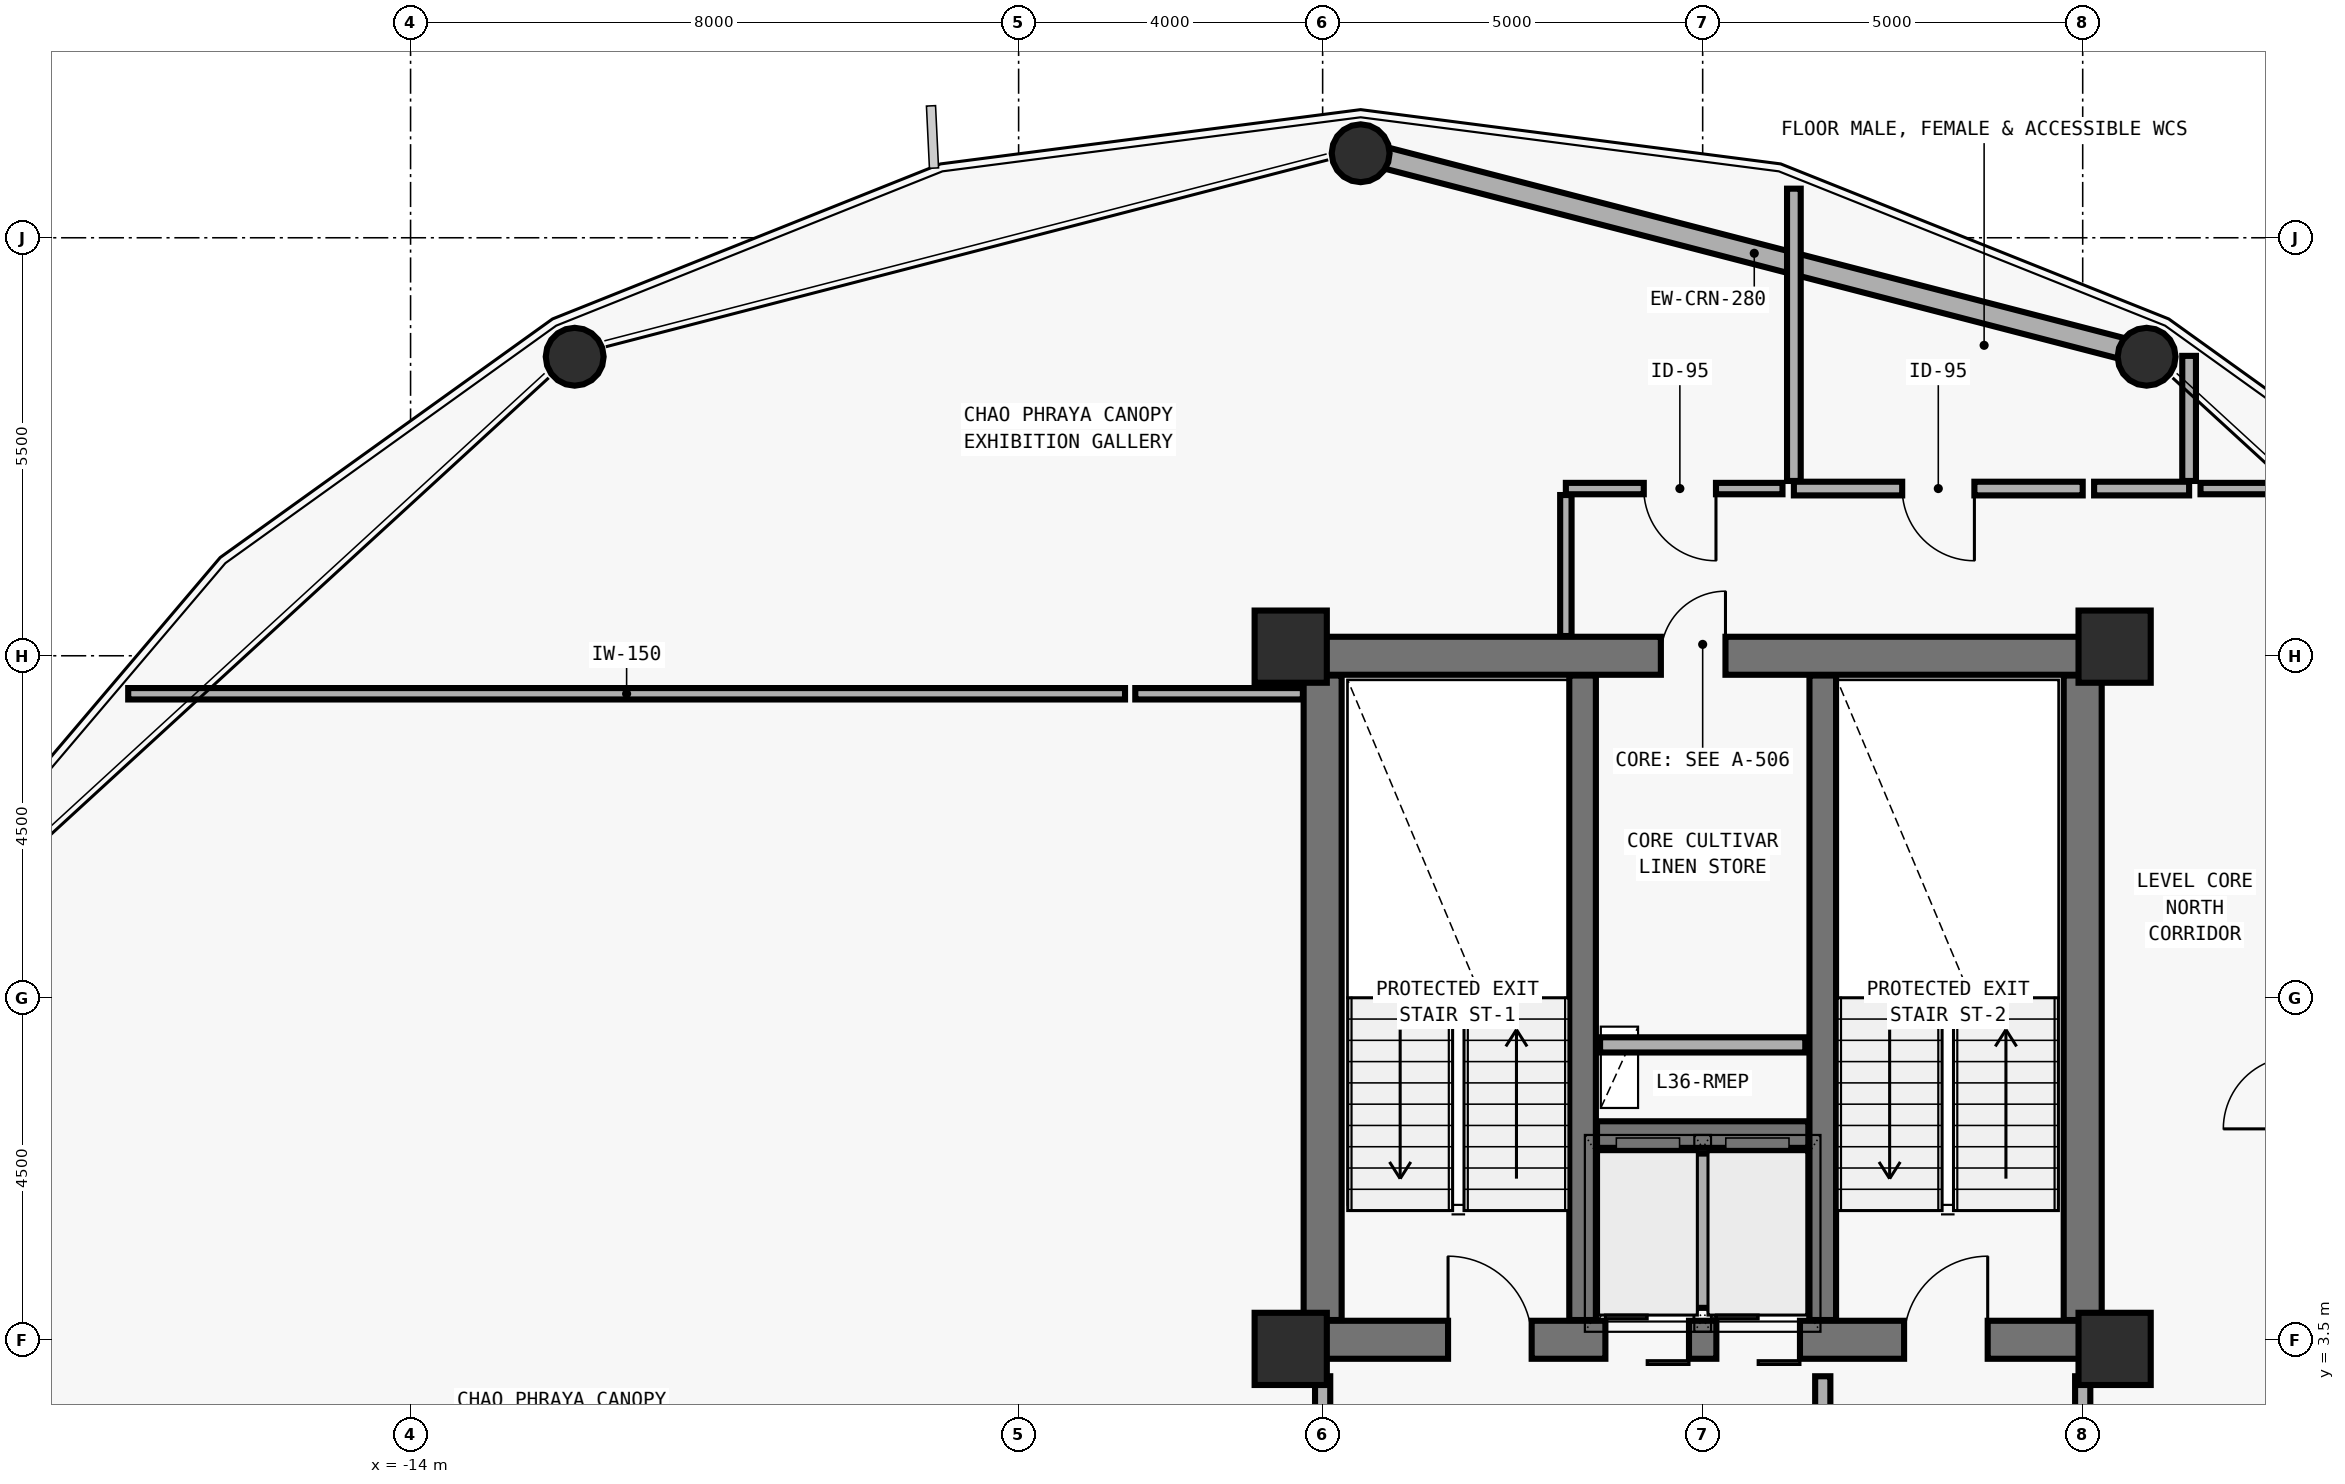
"""IFC4 building model, lengths in metres.
Left out: names, types, materials, properties, quantities, classifications, styles, units other than length and angle.
Written with IfcOpenShell. Run it as: python <this file> out.ifc"""

import sys

from ifc_helpers import new_model, si_unit, direction, frame, frame_2d, origin, origin_2d, place, context, subcontext, project, spatial, rectangle, hollow_circle, extrude, element, fill, save


model = new_model("IFC4")
c1 = context("Model", 3, precision=1e-05, world=origin(), true_north=direction((0.0, 1.0)))
c2 = subcontext(c1, "Body", "Model", "MODEL_VIEW")
j1 = project(units=[si_unit("LENGTHUNIT", "METRE"), si_unit("PLANEANGLEUNIT", "RADIAN")], contexts=[c1])
p1 = place(None, origin())
s1 = spatial("IfcSite", under=j1, at=p1, CompositionType="ELEMENT")
p2 = place(p1, origin())
s2 = spatial("IfcBuilding", under=s1, at=p2, CompositionType="ELEMENT")
p3 = place(p2, frame((0.0, 0.0, 146.1)))
s3 = spatial("IfcBuildingStorey", under=s2, at=p3, CompositionType="ELEMENT", Elevation=146.1)
p4 = place(p3, frame((-2.0, 3.5, 0.0), z_axis=(0.0, 0.0, 1.0), x_axis=(1.0, 0.0, 0.0)))
e1 = element("IfcWall", 1, at=p4, inside=s3, PredefinedType="SHEAR", context=c2, shape_type="SweptSolid", body=[
    extrude(rectangle(XDim=10.0, YDim=0.5, at=frame_2d((5.0, 0.0))), origin(), (0.0, 0.0, 1.0), 3.892),
])
p5 = place(p4, frame((1.65, 0.0, 0.0)))
e2 = element("IfcOpeningElement", 2, at=p5, cuts=e1, PredefinedType="OPENING", context=c2, shape_type="SweptSolid", body=[
    extrude(rectangle(XDim=1.1, YDim=2.15, at=frame_2d((0.55, 1.075))), frame((0.0, 0.26, 0.0), z_axis=(0.0, -1.0, 0.0), x_axis=(1.0, 0.0, 0.0)), (0.0, 0.0, 1.0), 0.52),
])
p6 = place(p4, frame((7.65, 0.0, 0.0)))
e3 = element("IfcOpeningElement", 3, at=p6, cuts=e1, PredefinedType="OPENING", context=c2, shape_type="SweptSolid", body=[
    extrude(rectangle(XDim=1.1, YDim=2.15, at=frame_2d((0.55, 1.075))), frame((0.0, 0.26, 0.0), z_axis=(0.0, -1.0, 0.0), x_axis=(1.0, 0.0, 0.0)), (0.0, 0.0, 1.0), 0.52),
])
p7 = place(p4, frame((3.72, 0.0, 0.0)))
e4 = element("IfcOpeningElement", 4, at=p7, cuts=e1, PredefinedType="OPENING", context=c2, shape_type="SweptSolid", body=[
    extrude(rectangle(XDim=1.1, YDim=2.2, at=frame_2d((0.55, 1.1))), frame((0.0, 0.26, 0.0), z_axis=(0.0, -1.0, 0.0), x_axis=(1.0, 0.0, 0.0)), (0.0, 0.0, 1.0), 0.52),
])
p8 = place(p4, frame((5.18, 0.0, 0.0)))
e5 = element("IfcOpeningElement", 5, at=p8, cuts=e1, PredefinedType="OPENING", context=c2, shape_type="SweptSolid", body=[
    extrude(rectangle(XDim=1.1, YDim=2.2, at=frame_2d((0.55, 1.1))), frame((0.0, 0.26, 0.0), z_axis=(0.0, -1.0, 0.0), x_axis=(1.0, 0.0, 0.0)), (0.0, 0.0, 1.0), 0.52),
])
p9 = place(p3, frame((-2.0, 12.5, 0.0), z_axis=(0.0, 0.0, 1.0), x_axis=(1.0, 0.0, 0.0)))
e6 = element("IfcWall", 6, at=p9, inside=s3, PredefinedType="SHEAR", context=c2, shape_type="SweptSolid", body=[
    extrude(rectangle(XDim=10.0, YDim=0.5, at=frame_2d((5.0, 0.0))), origin(), (0.0, 0.0, 1.0), 3.892),
])
p10 = place(p9, frame((4.45, 0.0, 0.0)))
e7 = element("IfcOpeningElement", 7, at=p10, cuts=e6, PredefinedType="OPENING", context=c2, shape_type="SweptSolid", body=[
    extrude(rectangle(XDim=0.85, YDim=2.1, at=frame_2d((0.425, 1.05))), frame((0.0, 0.26, 0.0), z_axis=(0.0, -1.0, 0.0), x_axis=(1.0, 0.0, 0.0)), (0.0, 0.0, 1.0), 0.52),
])
for number, where, z_axis, x_axis in (
    (8, (-2.0, 3.76, 0.0), (0.0, 0.0, 1.0), (0.0, 1.0, 0.0)),
    (9, (8.0, 3.76, 0.0), (0.0, 0.0, 1.0), (0.0, 1.0, 0.0)),
):
    element("IfcWall", number, at=place(p3, frame(where, z_axis=z_axis, x_axis=x_axis)), inside=s3, PredefinedType="SHEAR", context=c2, shape_type="SweptSolid", body=[
        extrude(rectangle(XDim=8.48, YDim=0.5, at=frame_2d((4.24, 0.0))), origin(), (0.0, 0.0, 1.0), 3.892),
    ])
for number, where, z_axis, x_axis in (
    (10, (1.42, 3.76, 0.0), (0.0, 0.0, 1.0), (0.0, 1.0, 0.0)),
    (11, (4.58, 3.76, 0.0), (0.0, 0.0, 1.0), (0.0, 1.0, 0.0)),
):
    element("IfcWall", number, at=place(p3, frame(where, z_axis=z_axis, x_axis=x_axis)), inside=s3, PredefinedType="SHEAR", context=c2, shape_type="SweptSolid", body=[
        extrude(rectangle(XDim=8.48, YDim=0.35, at=frame_2d((4.24, 0.0))), origin(), (0.0, 0.0, 1.0), 3.892),
    ])
p11 = place(p3, frame((1.61, 6.2, 0.0), z_axis=(0.0, 0.0, 1.0), x_axis=(1.0, 0.0, 0.0)))
e12 = element("IfcWall", 12, at=p11, inside=s3, PredefinedType="SHEAR", context=c2, shape_type="SweptSolid", body=[
    extrude(rectangle(XDim=2.78, YDim=0.35, at=frame_2d((1.39, 0.0))), origin(), (0.0, 0.0, 1.0), 3.892),
])
for number, where, z_axis, x_axis in (
    (13, (-2.42, 12.62, 0.0), (0.0, 0.0, 1.0), (1.0, 0.0, 0.0)),
    (14, (8.42, 12.62, 0.0), (0.0, 0.0, 1.0), (1.0, 0.0, 0.0)),
    (15, (-2.42, 3.38, 0.0), (0.0, 0.0, 1.0), (1.0, 0.0, 0.0)),
    (16, (8.42, 3.38, 0.0), (0.0, 0.0, 1.0), (1.0, 0.0, 0.0)),
):
    element("IfcColumn", number, at=place(p3, frame(where, z_axis=z_axis, x_axis=x_axis)), inside=s3, PredefinedType="COLUMN", context=c2, shape_type="SweptSolid", body=[
        extrude(rectangle(XDim=0.95, YDim=0.95, at=origin_2d()), origin(), (0.0, 0.0, 1.0), 3.875),
    ])
p12 = place(p3, frame((8.857, 16.455, 0.0), z_axis=(-0.008630735893, -0.010709672276, 0.999905402184), x_axis=(0.77862958397, -0.627483841199, 0.0)))
e17 = element("IfcColumn", 17, at=p12, inside=s3, PredefinedType="COLUMN", context=c2, shape_type="SweptSolid", body=[
    extrude(hollow_circle(Radius=0.381, WallThickness=0.028, at=origin_2d()), origin(), (0.0, 0.0, 1.0), 3.875),
])
p13 = place(p3, frame((-1.5, 19.136, 0.0), z_axis=(0.0, -0.01241083843, 0.999922982579), x_axis=(1.0, 0.0, 0.0)))
e18 = element("IfcColumn", 18, at=p13, inside=s3, PredefinedType="COLUMN", context=c2, shape_type="SweptSolid", body=[
    extrude(hollow_circle(Radius=0.381, WallThickness=0.028, at=origin_2d()), origin(), (0.0, 0.0, 1.0), 3.875),
])
p14 = place(p3, frame((-11.857, 16.455, 0.0), z_axis=(0.008630735893, -0.010709672276, 0.999905402184), x_axis=(0.77862958397, 0.627483841199, 0.0)))
e19 = element("IfcColumn", 19, at=p14, inside=s3, PredefinedType="COLUMN", context=c2, shape_type="SweptSolid", body=[
    extrude(hollow_circle(Radius=0.381, WallThickness=0.028, at=origin_2d()), origin(), (0.0, 0.0, 1.0), 3.875),
])
p15 = place(p3, frame((-1.175, 19.052, 0.0), z_axis=(0.0, 0.0, 1.0), x_axis=(0.968104156691, -0.250548082806, 0.0)))
e20 = element("IfcWall", 20, at=p15, inside=s3, PredefinedType="SOLIDWALL", context=c2, shape_type="SweptSolid", body=[
    extrude(rectangle(XDim=10.027, YDim=0.28, at=frame_2d((5.013, 0.0))), origin(), (0.0, 0.0, 1.0), 3.16),
])
p16 = place(p3, frame((3.0, 3.92, 0.0), z_axis=(0.0, 0.0, 1.0), x_axis=(0.0, 1.0, 0.0)))
e21 = element("IfcWall", 21, at=p16, inside=s3, PredefinedType="SOLIDWALL", context=c2, shape_type="SweptSolid", body=[
    extrude(rectangle(XDim=2.03, YDim=0.2, at=frame_2d((1.015, 0.0))), origin(), (0.0, 0.0, 1.0), 3.64),
])
p17 = place(p3, frame((1.65, 7.38, 0.0), z_axis=(0.0, 0.0, 1.0), x_axis=(1.0, 0.0, 0.0)))
e22 = element("IfcWall", 22, at=p17, inside=s3, PredefinedType="SOLIDWALL", context=c2, shape_type="SweptSolid", body=[
    extrude(rectangle(XDim=2.7, YDim=0.2, at=frame_2d((1.35, 0.0))), origin(), (0.0, 0.0, 1.0), 3.64),
])
p18 = place(p3, frame((4.58, 0.83, 0.0), z_axis=(0.0, 0.0, 1.0), x_axis=(0.0, 1.0, 0.0)))
e23 = element("IfcWall", 23, at=p18, inside=s3, PredefinedType="MOVABLE", context=c2, shape_type="SweptSolid", body=[
    extrude(rectangle(XDim=2.19, YDim=0.2, at=frame_2d((1.095, 0.0))), origin(), (0.0, 0.0, 1.0), 3.64),
])
p19 = place(p18, frame((0.66, 0.0, 0.0)))
e24 = element("IfcOpeningElement", 24, at=p19, cuts=e23, PredefinedType="OPENING", context=c2, shape_type="SweptSolid", body=[
    extrude(rectangle(XDim=1.0, YDim=2.1, at=frame_2d((0.5, 1.05))), frame((0.0, 0.11, 0.0), z_axis=(0.0, -1.0, 0.0), x_axis=(1.0, 0.0, 0.0)), (0.0, 0.0, 1.0), 0.22),
])
p20 = place(p3, frame((8.0, 0.72, 0.0), z_axis=(0.0, 0.0, 1.0), x_axis=(0.0, 1.0, 0.0)))
e25 = element("IfcWall", 25, at=p20, inside=s3, PredefinedType="MOVABLE", context=c2, shape_type="SweptSolid", body=[
    extrude(rectangle(XDim=2.3, YDim=0.2, at=frame_2d((1.15, 0.0))), origin(), (0.0, 0.0, 1.0), 2.872),
])
p21 = place(p20, frame((0.845, 0.0, 0.0)))
e26 = element("IfcOpeningElement", 26, at=p21, cuts=e25, PredefinedType="OPENING", context=c2, shape_type="SweptSolid", body=[
    extrude(rectangle(XDim=0.85, YDim=2.1, at=frame_2d((0.425, 1.05))), frame((0.0, 0.11, 0.0), z_axis=(0.0, -1.0, 0.0), x_axis=(1.0, 0.0, 0.0)), (0.0, 0.0, 1.0), 0.22),
])
p22 = place(p3, frame((8.0, 14.7, 0.0), z_axis=(0.0, 0.0, 1.0), x_axis=(-1.0, 0.0, 0.0)))
e27 = element("IfcWall", 27, at=p22, inside=s3, PredefinedType="PLUMBINGWALL", context=c2, shape_type="SweptSolid", body=[
    extrude(rectangle(XDim=3.8, YDim=0.18, at=frame_2d((1.9, 0.0))), origin(), (0.0, 0.0, 1.0), 3.222),
])
p23 = place(p22, frame((1.425, 0.0, 0.0)))
e28 = element("IfcOpeningElement", 28, at=p23, cuts=e27, PredefinedType="OPENING", context=c2, shape_type="SweptSolid", body=[
    extrude(rectangle(XDim=0.95, YDim=2.1, at=frame_2d((0.475, 1.05))), frame((0.0, 0.1, 0.0), z_axis=(0.0, -1.0, 0.0), x_axis=(1.0, 0.0, 0.0)), (0.0, 0.0, 1.0), 0.2),
])
p24 = place(p3, frame((4.05, 14.7, 0.0), z_axis=(0.0, 0.0, 1.0), x_axis=(-1.0, 0.0, 0.0)))
e29 = element("IfcWall", 29, at=p24, inside=s3, PredefinedType="PARTITIONING", context=c2, shape_type="SweptSolid", body=[
    extrude(rectangle(XDim=2.85, YDim=0.15, at=frame_2d((1.425, 0.0))), origin(), (0.0, 0.0, 1.0), 3.222),
])
p25 = place(p24, frame((0.875, 0.0, 0.0)))
e30 = element("IfcOpeningElement", 30, at=p25, cuts=e29, PredefinedType="OPENING", context=c2, shape_type="SweptSolid", body=[
    extrude(rectangle(XDim=0.95, YDim=2.1, at=frame_2d((0.475, 1.05))), frame((0.0, 0.085, 0.0), z_axis=(0.0, -1.0, 0.0), x_axis=(1.0, 0.0, 0.0)), (0.0, 0.0, 1.0), 0.17),
])
p26 = place(p3, frame((-2.0, 0.72, 0.0), z_axis=(0.0, 0.0, 1.0), x_axis=(0.0, 1.0, 0.0)))
e31 = element("IfcWall", 31, at=p26, inside=s3, PredefinedType="MOVABLE", context=c2, shape_type="SweptSolid", body=[
    extrude(rectangle(XDim=2.3, YDim=0.2, at=frame_2d((1.15, 0.0))), origin(), (0.0, 0.0, 1.0), 2.872),
])
p27 = place(p3, frame((9.4, 14.7, 0.0), z_axis=(0.0, 0.0, 1.0), x_axis=(-1.0, 0.0, 0.0)))
e32 = element("IfcWall", 32, at=p27, inside=s3, PredefinedType="PLUMBINGWALL", context=c2, shape_type="SweptSolid", body=[
    extrude(rectangle(XDim=1.25, YDim=0.18, at=frame_2d((0.625, 0.0))), origin(), (0.0, 0.0, 1.0), 3.222),
])
p28 = place(p3, frame((-17.715, 12.0, 0.0), z_axis=(0.0, 0.0, 1.0), x_axis=(1.0, 0.0, 0.0)))
e33 = element("IfcWall", 33, at=p28, inside=s3, PredefinedType="PARTITIONING", context=c2, shape_type="SweptSolid", body=[
    extrude(rectangle(XDim=13.115, YDim=0.15, at=frame_2d((6.558, 0.0))), origin(), (0.0, 0.0, 1.0), 3.072),
])
p29 = place(p3, frame((-4.465, 12.0, 0.0), z_axis=(0.0, 0.0, 1.0), x_axis=(1.0, 0.0, 0.0)))
e34 = element("IfcWall", 34, at=p29, inside=s3, PredefinedType="PARTITIONING", context=c2, shape_type="SweptSolid", body=[
    extrude(rectangle(XDim=2.205, YDim=0.15, at=frame_2d((1.103, 0.0))), origin(), (0.0, 0.0, 1.0), 3.072),
])
p30 = place(p3, frame((1.2, 14.615, 0.0), z_axis=(0.0, 0.0, 1.0), x_axis=(0.0, -1.0, 0.0)))
e35 = element("IfcWall", 35, at=p30, inside=s3, PredefinedType="PARTITIONING", context=c2, shape_type="SweptSolid", body=[
    extrude(rectangle(XDim=1.855, YDim=0.15, at=frame_2d((0.927, 0.0))), origin(), (0.0, 0.0, 1.0), 3.64),
])
p31 = place(p3, frame((4.2, 18.646, 0.0), z_axis=(0.0, 0.0, 1.0), x_axis=(0.0, -1.0, 0.0)))
e36 = element("IfcWall", 36, at=p31, inside=s3, PredefinedType="PLUMBINGWALL", context=c2, shape_type="SweptSolid", body=[
    extrude(rectangle(XDim=3.846, YDim=0.18, at=frame_2d((1.923, 0.0))), origin(), (0.0, 0.0, 1.0), 3.64),
])
p32 = place(p3, frame((10.715, 14.7, 0.0), z_axis=(0.0, 0.0, 1.0), x_axis=(-1.0, 0.0, 0.0)))
e37 = element("IfcWall", 37, at=p32, inside=s3, PredefinedType="PARTITIONING", context=c2, shape_type="SweptSolid", body=[
    extrude(rectangle(XDim=1.165, YDim=0.15, at=frame_2d((0.583, 0.0))), origin(), (0.0, 0.0, 1.0), 3.64),
])
p33 = place(p3, frame((9.4, 14.8, 0.0), z_axis=(0.0, 0.0, 1.0), x_axis=(0.0, 1.0, 0.0)))
e38 = element("IfcWall", 38, at=p33, inside=s3, PredefinedType="PLUMBINGWALL", context=c2, shape_type="SweptSolid", body=[
    extrude(rectangle(XDim=1.646, YDim=0.18, at=frame_2d((0.823, 0.0))), origin(), (0.0, 0.0, 1.0), 3.072),
])
p34 = place(p5, origin())
e39 = element("IfcDoor", 39, at=p34, inside=s3, OperationType="SINGLE_SWING_LEFT", PredefinedType="DOOR", context=c2, shape_type="SweptSolid", body=[
    extrude(rectangle(XDim=1.1, YDim=2.15, at=frame_2d((0.55, 1.075))), frame((0.0, 0.025, 0.0), z_axis=(0.0, -1.0, 0.0), x_axis=(1.0, 0.0, 0.0)), (0.0, 0.0, 1.0), 0.05),
])
fill(e2, e39)
p35 = place(p6, origin())
e40 = element("IfcDoor", 40, at=p35, inside=s3, OperationType="SINGLE_SWING_RIGHT", PredefinedType="DOOR", context=c2, shape_type="SweptSolid", body=[
    extrude(rectangle(XDim=1.1, YDim=2.15, at=frame_2d((0.55, 1.075))), frame((0.0, 0.025, 0.0), z_axis=(0.0, -1.0, 0.0), x_axis=(1.0, 0.0, 0.0)), (0.0, 0.0, 1.0), 0.05),
])
fill(e3, e40)
p36 = place(p7, origin())
e41 = element("IfcDoor", 41, at=p36, inside=s3, OperationType="DOUBLE_DOOR_SLIDING", PredefinedType="DOOR", context=c2, shape_type="SweptSolid", body=[
    extrude(rectangle(XDim=1.1, YDim=2.2, at=frame_2d((0.55, 1.1))), frame((0.0, 0.025, 0.0), z_axis=(0.0, -1.0, 0.0), x_axis=(1.0, 0.0, 0.0)), (0.0, 0.0, 1.0), 0.05),
])
fill(e4, e41)
p37 = place(p8, origin())
e42 = element("IfcDoor", 42, at=p37, inside=s3, OperationType="DOUBLE_DOOR_SLIDING", PredefinedType="DOOR", context=c2, shape_type="SweptSolid", body=[
    extrude(rectangle(XDim=1.1, YDim=2.2, at=frame_2d((0.55, 1.1))), frame((0.0, 0.025, 0.0), z_axis=(0.0, -1.0, 0.0), x_axis=(1.0, 0.0, 0.0)), (0.0, 0.0, 1.0), 0.05),
])
fill(e5, e42)
p38 = place(p10, origin())
e43 = element("IfcDoor", 43, at=p38, inside=s3, OperationType="SINGLE_SWING_RIGHT", PredefinedType="DOOR", context=c2, shape_type="SweptSolid", body=[
    extrude(rectangle(XDim=0.85, YDim=2.1, at=frame_2d((0.425, 1.05))), frame((0.0, 0.025, 0.0), z_axis=(0.0, -1.0, 0.0), x_axis=(1.0, 0.0, 0.0)), (0.0, 0.0, 1.0), 0.05),
])
fill(e7, e43)
p39 = place(p23, origin())
e44 = element("IfcDoor", 44, at=p39, inside=s3, OperationType="SINGLE_SWING_LEFT", PredefinedType="DOOR", context=c2, shape_type="SweptSolid", body=[
    extrude(rectangle(XDim=0.95, YDim=2.1, at=frame_2d((0.475, 1.05))), frame((0.0, 0.025, 0.0), z_axis=(0.0, -1.0, 0.0), x_axis=(1.0, 0.0, 0.0)), (0.0, 0.0, 1.0), 0.05),
])
fill(e28, e44)
p40 = place(p25, origin())
e45 = element("IfcDoor", 45, at=p40, inside=s3, OperationType="SINGLE_SWING_LEFT", PredefinedType="DOOR", context=c2, shape_type="SweptSolid", body=[
    extrude(rectangle(XDim=0.95, YDim=2.1, at=frame_2d((0.475, 1.05))), frame((0.0, 0.025, 0.0), z_axis=(0.0, -1.0, 0.0), x_axis=(1.0, 0.0, 0.0)), (0.0, 0.0, 1.0), 0.05),
])
fill(e30, e45)
save(model, sys.argv[1])
